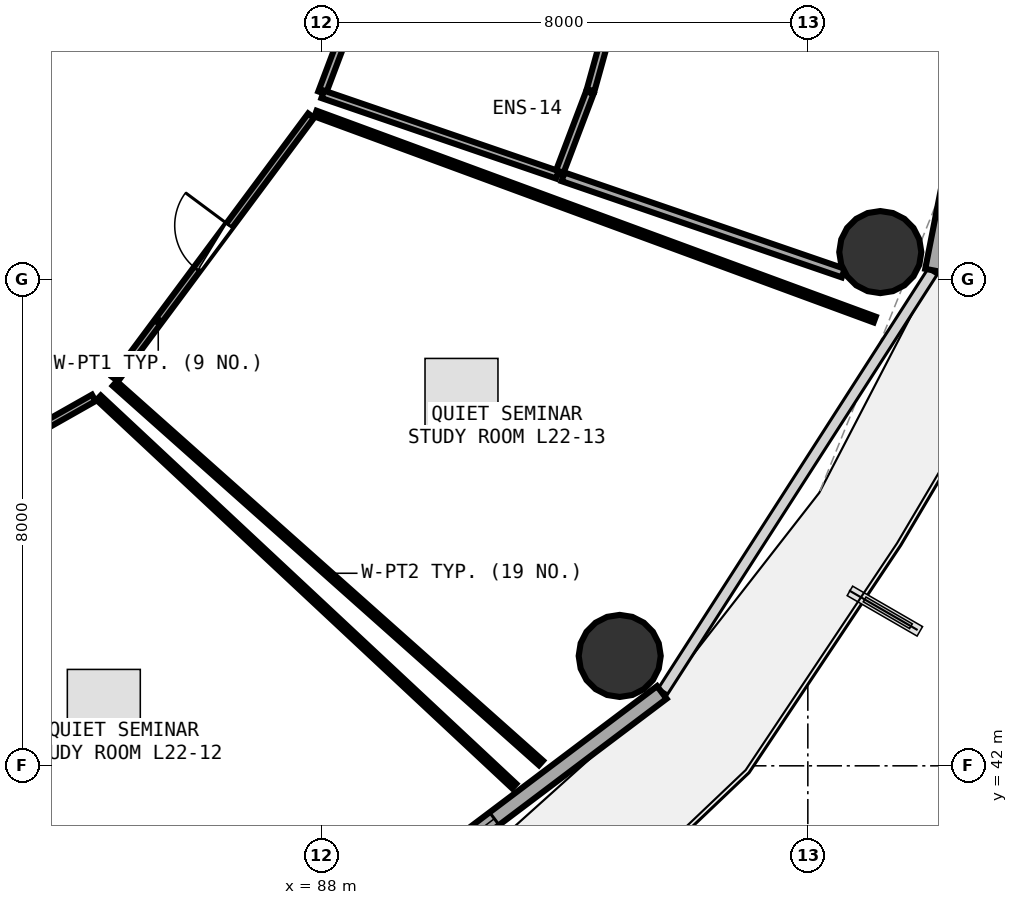
"""IFC4 building model, lengths in metres.
Left out: names, types, materials, properties, quantities, classifications, styles, units other than length and angle.
Written with IfcOpenShell. Run it as: python <this file> out.ifc"""

import sys

from ifc_helpers import new_model, si_unit, direction, frame, frame_2d, origin, origin_2d, place, context, subcontext, project, spatial, rectangle, circle, extrude, element, fill, save


model = new_model("IFC4")
c1 = context("Model", 3, precision=1e-05, world=origin(), true_north=direction((0.0, 1.0)))
c2 = subcontext(c1, "Body", "Model", "MODEL_VIEW")
j1 = project(units=[si_unit("LENGTHUNIT", "METRE"), si_unit("PLANEANGLEUNIT", "RADIAN")], contexts=[c1])
p1 = place(None, origin())
s1 = spatial("IfcSite", under=j1, at=p1, CompositionType="ELEMENT")
p2 = place(p1, origin())
s2 = spatial("IfcBuilding", under=s1, at=p2, CompositionType="ELEMENT")
p3 = place(p2, frame((0.0, 0.0, 87.6)))
s3 = spatial("IfcBuildingStorey", under=s2, at=p3, CompositionType="ELEMENT", Elevation=87.6)
for number, where, z_axis, x_axis in (
    (1, (92.906, 43.807, 0.0), (0.0, 0.0, 1.0), (1.0, 0.0, 0.0)),
    (2, (97.192, 50.448, 0.0), (0.0, 0.0, 1.0), (1.0, 0.0, 0.0)),
):
    element("IfcColumn", number, at=place(p3, frame(where, z_axis=z_axis, x_axis=x_axis)), inside=s3, PredefinedType="COLUMN", context=c2, shape_type="SweptSolid", body=[
        extrude(circle(Radius=0.675, at=origin_2d()), origin(), (0.0, 0.0, 1.0), 3.75),
    ])
p4 = place(p3, frame((86.812, 38.09, 0.0), z_axis=(0.0, 0.0, 1.0), x_axis=(0.798501507879, 0.601992808857, 0.0)))
e3 = element("IfcWall", 3, at=p4, inside=s3, PredefinedType="SOLIDWALL", context=c2, shape_type="SweptSolid", body=[
    extrude(rectangle(XDim=8.499, YDim=0.26, at=frame_2d((4.25, 0.0))), origin(), (0.0, 0.0, 1.0), 3.475),
])
p5 = place(p4, frame((3.45, 0.0, 0.85)))
e4 = element("IfcOpeningElement", 4, at=p5, cuts=e3, PredefinedType="OPENING", context=c2, shape_type="SweptSolid", body=[
    extrude(rectangle(XDim=1.6, YDim=1.45, at=frame_2d((0.8, 0.725))), frame((0.0, 0.14, 0.0), z_axis=(0.0, -1.0, 0.0), x_axis=(1.0, 0.0, 0.0)), (0.0, 0.0, 1.0), 0.28),
])
p6 = place(p3, frame((98.059, 50.148, 0.0), z_axis=(0.0, 0.0, 1.0), x_axis=(0.192581843632, 0.981280914674, 0.0)))
e5 = element("IfcWall", 5, at=p6, inside=s3, PredefinedType="SOLIDWALL", context=c2, shape_type="SweptSolid", body=[
    extrude(rectangle(XDim=7.987, YDim=0.26, at=frame_2d((3.993, 0.0))), origin(), (0.0, 0.0, 1.0), 3.475),
])
p7 = place(p6, frame((3.193, 0.0, 0.85)))
e6 = element("IfcOpeningElement", 6, at=p7, cuts=e5, PredefinedType="OPENING", context=c2, shape_type="SweptSolid", body=[
    extrude(rectangle(XDim=1.6, YDim=1.45, at=frame_2d((0.8, 0.725))), frame((0.0, 0.14, 0.0), z_axis=(0.0, -1.0, 0.0), x_axis=(1.0, 0.0, 0.0)), (0.0, 0.0, 1.0), 0.28),
])
p8 = place(p3, frame((79.365, 45.28, 0.0), z_axis=(0.0, 0.0, 1.0), x_axis=(0.870068136537, 0.49293147372, 0.0)))
e7 = element("IfcWall", 7, at=p8, inside=s3, PredefinedType="PARTITIONING", context=c2, shape_type="SweptSolid", body=[
    extrude(rectangle(XDim=5.621, YDim=0.12, at=frame_2d((2.811, 0.0))), origin(), (0.0, 0.0, 1.0), 2.925),
])
p9 = place(p8, frame((2.36, 0.0, 0.0)))
e8 = element("IfcOpeningElement", 8, at=p9, cuts=e7, PredefinedType="OPENING", context=c2, shape_type="SweptSolid", body=[
    extrude(rectangle(XDim=0.9, YDim=2.08, at=frame_2d((0.45, 1.04))), frame((0.0, 0.07, 0.0), z_axis=(0.0, -1.0, 0.0), x_axis=(1.0, 0.0, 0.0)), (0.0, 0.0, 1.0), 0.14),
])
p10 = place(p3, frame((84.608, 48.36, 0.0), z_axis=(0.0, 0.0, 1.0), x_axis=(0.596833425992, 0.802365167251, 0.0)))
e9 = element("IfcWall", 9, at=p10, inside=s3, PredefinedType="PARTITIONING", context=c2, shape_type="SweptSolid", body=[
    extrude(rectangle(XDim=5.399, YDim=0.12, at=frame_2d((2.699, 0.0))), origin(), (0.0, 0.0, 1.0), 2.925),
])
p11 = place(p10, frame((2.249, 0.0, 0.0)))
e10 = element("IfcOpeningElement", 10, at=p11, cuts=e9, PredefinedType="OPENING", context=c2, shape_type="SweptSolid", body=[
    extrude(rectangle(XDim=0.9, YDim=2.08, at=frame_2d((0.45, 1.04))), frame((0.0, 0.07, 0.0), z_axis=(0.0, -1.0, 0.0), x_axis=(1.0, 0.0, 0.0)), (0.0, 0.0, 1.0), 0.14),
])
p12 = place(p3, frame((84.337, 48.053, 0.0), z_axis=(0.0, 0.0, 1.0), x_axis=(0.730663657097, -0.682737592489, 0.0)))
e11 = element("IfcWall", 11, at=p12, inside=s3, PredefinedType="PARTITIONING", context=c2, shape_type="SweptSolid", body=[
    extrude(rectangle(XDim=9.353, YDim=0.1, at=frame_2d((4.676, 0.0))), origin(), (0.0, 0.0, 1.0), 2.975),
])
p13 = place(p3, frame((87.904, 52.726, 0.0), z_axis=(0.0, 0.0, 1.0), x_axis=(0.938361829853, -0.345654562063, 0.0)))
e12 = element("IfcWall", 12, at=p13, inside=s3, PredefinedType="PARTITIONING", context=c2, shape_type="SweptSolid", body=[
    extrude(rectangle(XDim=9.8, YDim=0.1, at=frame_2d((4.9, 0.0))), origin(), (0.0, 0.0, 1.0), 2.925),
])
p14 = place(p3, frame((91.611, 42.048, 0.0), z_axis=(0.0, 0.0, 1.0), x_axis=(-0.747021589751, 0.664799777713, 0.0)))
e13 = element("IfcWall", 13, at=p14, inside=s3, PredefinedType="PARTITIONING", context=c2, shape_type="SweptSolid", body=[
    extrude(rectangle(XDim=9.383, YDim=0.1, at=frame_2d((4.691, 0.0))), origin(), (0.0, 0.0, 1.0), 2.975),
])
p15 = place(p3, frame((88.01, 53.068, 0.0), z_axis=(0.0, 0.0, 1.0), x_axis=(0.353582849957, 0.93540321157, 0.0)))
e14 = element("IfcWall", 14, at=p15, inside=s3, PredefinedType="PLUMBINGWALL", context=c2, shape_type="SweptSolid", body=[
    extrude(rectangle(XDim=1.12, YDim=0.13, at=frame_2d((0.56, 0.0))), origin(), (0.0, 0.0, 1.0), 3.235),
])
p16 = place(p3, frame((92.81, 54.484, 0.0), z_axis=(0.0, 0.0, 1.0), x_axis=(-0.268041350083, -0.963407408445, 0.0)))
e15 = element("IfcWall", 15, at=p16, inside=s3, PredefinedType="PLUMBINGWALL", context=c2, shape_type="SweptSolid", body=[
    extrude(rectangle(XDim=1.426, YDim=0.13, at=frame_2d((0.713, 0.0))), origin(), (0.0, 0.0, 1.0), 3.48),
])
p17 = place(p3, frame((92.415, 53.072, 0.0), z_axis=(0.0, 0.0, 1.0), x_axis=(-0.354833873896, -0.934929367351, 0.0)))
e16 = element("IfcWall", 16, at=p17, inside=s3, PredefinedType="PLUMBINGWALL", context=c2, shape_type="SweptSolid", body=[
    extrude(rectangle(XDim=1.434, YDim=0.13, at=frame_2d((0.717, 0.0))), origin(), (0.0, 0.0, 1.0), 3.48),
])
p18 = place(p3, frame((91.88, 51.719, 0.0), z_axis=(0.0, 0.0, 1.0), x_axis=(-0.945930729077, 0.324368703466, 0.0)))
e17 = element("IfcWall", 17, at=p18, inside=s3, PredefinedType="PLUMBINGWALL", context=c2, shape_type="SweptSolid", body=[
    extrude(rectangle(XDim=4.079, YDim=0.13, at=frame_2d((2.039, 0.0))), origin(), (0.0, 0.0, 1.0), 3.175),
])
p19 = place(p3, frame((96.583, 50.104, 0.0), z_axis=(0.0, 0.0, 1.0), x_axis=(-0.945793886269, 0.324767493288, 0.0)))
e18 = element("IfcWall", 18, at=p19, inside=s3, PredefinedType="PARTITIONING", context=c2, shape_type="SweptSolid", body=[
    extrude(rectangle(XDim=4.873, YDim=0.15, at=frame_2d((2.437, 0.0))), origin(), (0.0, 0.0, 1.0), 2.925),
])
p20 = place(p5, origin())
e19 = element("IfcWindow", 19, at=p20, inside=s3, PartitioningType="SINGLE_PANEL", PredefinedType="WINDOW", context=c2, shape_type="SweptSolid", body=[
    extrude(rectangle(XDim=1.6, YDim=1.45, at=frame_2d((0.8, 0.725))), frame((0.0, 0.03, 0.0), z_axis=(0.0, -1.0, 0.0), x_axis=(1.0, 0.0, 0.0)), (0.0, 0.0, 1.0), 0.06),
])
fill(e4, e19)
p21 = place(p11, origin())
e20 = element("IfcDoor", 20, at=p21, inside=s3, OperationType="SINGLE_SWING_RIGHT", PredefinedType="DOOR", context=c2, shape_type="SweptSolid", body=[
    extrude(rectangle(XDim=0.9, YDim=2.08, at=frame_2d((0.45, 1.04))), frame((0.0, 0.025, 0.0), z_axis=(0.0, -1.0, 0.0), x_axis=(1.0, 0.0, 0.0)), (0.0, 0.0, 1.0), 0.05),
])
fill(e10, e20)
save(model, sys.argv[1])
